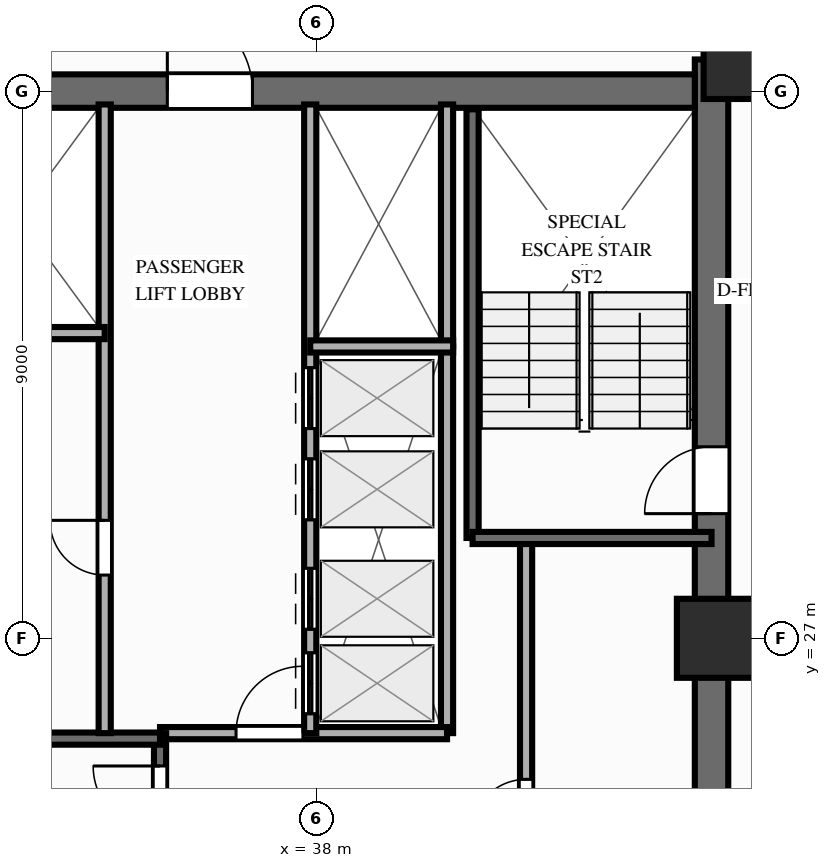
"""IFC4 building model, lengths in metres.
Left out: names, types, materials, properties, quantities, classifications, styles, units other than length and angle.
Written with IfcOpenShell. Run it as: python <this file> out.ifc"""

import sys

from ifc_helpers import new_model, si_unit, direction, frame, frame_2d, origin, origin_2d, place, context, subcontext, project, spatial, rectangle, extrude, source, transform, mapped, element, fill, save


model = new_model("IFC4")
c1 = context("Model", 3, precision=1e-05, world=origin(), true_north=direction((0.0, 1.0)))
c2 = subcontext(c1, "Body", "Model", "MODEL_VIEW")
j1 = project(units=[si_unit("LENGTHUNIT", "METRE"), si_unit("PLANEANGLEUNIT", "RADIAN")], contexts=[c1])
p1 = place(None, origin())
s1 = spatial("IfcSite", under=j1, at=p1, CompositionType="ELEMENT")
p2 = place(p1, origin())
s2 = spatial("IfcBuilding", under=s1, at=p2, CompositionType="ELEMENT")
p3 = place(p2, frame((0.0, 0.0, 141.75)))
s3 = spatial("IfcBuildingStorey", under=s2, at=p3, CompositionType="ELEMENT", Elevation=141.75)
p4 = place(p3, frame((44.5, 17.48, 0.0), z_axis=(0.0, 0.0, 1.0), x_axis=(0.0, 1.0, 0.0)))
e1 = element("IfcWall", 1, at=p4, inside=s3, PredefinedType="SHEAR", context=c2, shape_type="SweptSolid", body=[
    extrude(rectangle(XDim=19.04, YDim=0.55, at=frame_2d((9.52, 0.0))), origin(), (0.0, 0.0, 1.0), 3.0),
])
p5 = place(p4, frame((12.67, 0.0, 0.0), z_axis=(0.0, 0.0, 1.0), x_axis=(-1.0, 0.0, 0.0)))
e2 = element("IfcOpeningElement", 2, at=p5, cuts=e1, PredefinedType="OPENING", context=c2, shape_type="SweptSolid", body=[
    extrude(rectangle(XDim=1.1, YDim=2.15, at=frame_2d((0.55, 1.075))), frame((0.0, 0.287, 0.0), z_axis=(0.0, -1.0, 0.0), x_axis=(1.0, 0.0, 0.0)), (0.0, 0.0, 1.0), 0.574),
])
p6 = place(p3, frame((31.775, 36.0, 0.0), z_axis=(0.0, 0.0, 1.0), x_axis=(1.0, 0.0, 0.0)))
e3 = element("IfcWall", 3, at=p6, inside=s3, PredefinedType="SHEAR", context=c2, shape_type="SweptSolid", body=[
    extrude(rectangle(XDim=12.45, YDim=0.55, at=frame_2d((6.225, 0.0))), origin(), (0.0, 0.0, 1.0), 3.0),
])
p7 = place(p6, frame((5.175, 0.0, 0.0), z_axis=(0.0, 0.0, 1.0), x_axis=(-1.0, 0.0, 0.0)))
e4 = element("IfcOpeningElement", 4, at=p7, cuts=e3, PredefinedType="OPENING", context=c2, shape_type="SweptSolid", body=[
    extrude(rectangle(XDim=1.4, YDim=2.15, at=frame_2d((0.7, 1.075))), frame((0.0, 0.287, 0.0), z_axis=(0.0, -1.0, 0.0), x_axis=(1.0, 0.0, 0.0)), (0.0, 0.0, 1.0), 0.574),
])
m1 = source(origin(), c2, "Body", "SweptSolid", [
    extrude(rectangle(XDim=1.3, YDim=1.3, at=origin_2d()), origin(), (0.0, 0.0, 1.0), 3.0),
])
for number, where, z_axis, x_axis in (
    (5, (45.02, 36.52, 0.0), (0.0, 0.0, 1.0), (1.0, 0.0, 0.0)),
    (6, (44.58, 27.0, 0.0), (0.0, 0.0, 1.0), (1.0, 0.0, 0.0)),
):
    element("IfcColumn", number, at=place(p3, frame(where, z_axis=z_axis, x_axis=x_axis)), inside=s3, PredefinedType="COLUMN", context=c2, shape_type="MappedRepresentation", body=[
        mapped(m1, transform((0.0, 0.0, 0.0), scale=1.0)),
    ])
p8 = place(p3, frame((41.45, 21.18, 0.0), z_axis=(0.0, 0.0, 1.0), x_axis=(0.0, 1.0, 0.0)))
e7 = element("IfcWall", 7, at=p8, inside=s3, PredefinedType="PARTITIONING", context=c2, shape_type="SweptSolid", body=[
    extrude(rectangle(XDim=7.42, YDim=0.2, at=frame_2d((3.71, 0.0))), origin(), (0.0, 0.0, 1.0), 2.7),
])
p9 = place(p8, frame((2.6, 0.0, 0.0)))
e8 = element("IfcOpeningElement", 8, at=p9, cuts=e7, PredefinedType="OPENING", context=c2, shape_type="SweptSolid", body=[
    extrude(rectangle(XDim=0.9, YDim=2.1, at=frame_2d((0.45, 1.05))), frame((0.0, 0.112, 0.0), z_axis=(0.0, -1.0, 0.0), x_axis=(1.0, 0.0, 0.0)), (0.0, 0.0, 1.0), 0.224),
])
p10 = place(p3, frame((40.15, 25.44, 0.0), z_axis=(0.0, 0.0, 1.0), x_axis=(0.0, 1.0, 0.0)))
e9 = element("IfcWall", 9, at=p10, inside=s3, PredefinedType="PARTITIONING", context=c2, shape_type="SweptSolid", body=[
    extrude(rectangle(XDim=6.36, YDim=0.2, at=frame_2d((3.18, 0.0))), origin(), (0.0, 0.0, 1.0), 2.7),
])
p11 = place(p3, frame((40.15, 31.8, 0.0), z_axis=(0.0, 0.0, 1.0), x_axis=(0.0, 1.0, 0.0)))
e10 = element("IfcWall", 10, at=p11, inside=s3, PredefinedType="PARTITIONING", context=c2, shape_type="SweptSolid", body=[
    extrude(rectangle(XDim=3.98, YDim=0.2, at=frame_2d((1.99, 0.0))), origin(), (0.0, 0.0, 1.0), 2.7),
])
p12 = place(p3, frame((35.43, 25.44, 0.0), z_axis=(0.0, 0.0, 1.0), x_axis=(1.0, 0.0, 0.0)))
e11 = element("IfcWall", 11, at=p12, inside=s3, PredefinedType="PARTITIONING", context=c2, shape_type="SweptSolid", body=[
    extrude(rectangle(XDim=4.72, YDim=0.2, at=frame_2d((2.36, 0.0))), origin(), (0.0, 0.0, 1.0), 2.7),
])
p13 = place(p12, frame((1.25, 0.0, 0.0)))
e12 = element("IfcOpeningElement", 12, at=p13, cuts=e11, PredefinedType="OPENING", context=c2, shape_type="SweptSolid", body=[
    extrude(rectangle(XDim=1.1, YDim=2.15, at=frame_2d((0.55, 1.075))), frame((0.0, 0.112, 0.0), z_axis=(0.0, -1.0, 0.0), x_axis=(1.0, 0.0, 0.0)), (0.0, 0.0, 1.0), 0.224),
])
p14 = place(p3, frame((35.43, 18.22, 0.0), z_axis=(0.0, 0.0, 1.0), x_axis=(0.0, 1.0, 0.0)))
e13 = element("IfcWall", 13, at=p14, inside=s3, PredefinedType="SOLIDWALL", context=c2, shape_type="SweptSolid", body=[
    extrude(rectangle(XDim=7.22, YDim=0.2, at=frame_2d((3.61, 0.0))), origin(), (0.0, 0.0, 1.0), 2.7),
])
p15 = place(p14, frame((6.68, 0.0, 0.0), z_axis=(0.0, 0.0, 1.0), x_axis=(-1.0, 0.0, 0.0)))
e14 = element("IfcOpeningElement", 14, at=p15, cuts=e13, PredefinedType="OPENING", context=c2, shape_type="SweptSolid", body=[
    extrude(rectangle(XDim=1.1, YDim=2.15, at=frame_2d((0.55, 1.075))), frame((0.0, 0.112, 0.0), z_axis=(0.0, -1.0, 0.0), x_axis=(1.0, 0.0, 0.0)), (0.0, 0.0, 1.0), 0.224),
])
p16 = place(p3, frame((31.5, 25.35, 0.0), z_axis=(0.0, 0.0, 1.0), x_axis=(1.0, 0.0, 0.0)))
e15 = element("IfcWall", 15, at=p16, inside=s3, PredefinedType="SOLIDWALL", context=c2, shape_type="SweptSolid", body=[
    extrude(rectangle(XDim=3.93, YDim=0.2, at=frame_2d((1.965, 0.0))), origin(), (0.0, 0.0, 1.0), 2.7),
])
p17 = place(p3, frame((40.57, 28.65, 0.0), z_axis=(0.0, 0.0, 1.0), x_axis=(0.0, 1.0, 0.0)))
e16 = element("IfcWall", 16, at=p17, inside=s3, PredefinedType="SOLIDWALL", context=c2, shape_type="SweptSolid", body=[
    extrude(rectangle(XDim=7.05, YDim=0.2, at=frame_2d((3.525, 0.0))), origin(), (0.0, 0.0, 1.0), 2.7),
])
p18 = place(p3, frame((40.57, 28.65, 0.0), z_axis=(0.0, 0.0, 1.0), x_axis=(1.0, 0.0, 0.0)))
e17 = element("IfcWall", 17, at=p18, inside=s3, PredefinedType="SOLIDWALL", context=c2, shape_type="SweptSolid", body=[
    extrude(rectangle(XDim=3.93, YDim=0.2, at=frame_2d((1.965, 0.0))), origin(), (0.0, 0.0, 1.0), 2.7),
])
p19 = place(p3, frame((34.52, 25.44, 0.0), z_axis=(0.0, 0.0, 1.0), x_axis=(0.0, 1.0, 0.0)))
e18 = element("IfcWall", 18, at=p19, inside=s3, PredefinedType="PARTITIONING", context=c2, shape_type="SweptSolid", body=[
    extrude(rectangle(XDim=10.34, YDim=0.2, at=frame_2d((5.17, 0.0))), origin(), (0.0, 0.0, 1.0), 2.7),
])
p20 = place(p19, frame((2.6, 0.0, 0.0)))
e19 = element("IfcOpeningElement", 19, at=p20, cuts=e18, PredefinedType="OPENING", context=c2, shape_type="SweptSolid", body=[
    extrude(rectangle(XDim=0.9, YDim=2.1, at=frame_2d((0.45, 1.05))), frame((0.0, 0.112, 0.0), z_axis=(0.0, -1.0, 0.0), x_axis=(1.0, 0.0, 0.0)), (0.0, 0.0, 1.0), 0.224),
])
p21 = place(p3, frame((31.72, 32.02, 0.0), z_axis=(0.0, 0.0, 1.0), x_axis=(1.0, 0.0, 0.0)))
e20 = element("IfcWall", 20, at=p21, inside=s3, PredefinedType="PARTITIONING", context=c2, shape_type="SweptSolid", body=[
    extrude(rectangle(XDim=2.8, YDim=0.2, at=frame_2d((1.4, 0.0))), origin(), (0.0, 0.0, 1.0), 2.7),
])
p22 = place(p3, frame((37.9, 25.44, 0.0), z_axis=(0.0, 0.0, 1.0), x_axis=(0.0, 1.0, 0.0)))
e21 = element("IfcWall", 21, at=p22, inside=s3, PredefinedType="PARTITIONING", context=c2, shape_type="SweptSolid", body=[
    extrude(rectangle(XDim=10.34, YDim=0.2, at=frame_2d((5.17, 0.0))), origin(), (0.0, 0.0, 1.0), 2.7),
])
p23 = place(p22, frame((0.32, 0.0, 0.0)))
e22 = element("IfcOpeningElement", 22, at=p23, cuts=e21, PredefinedType="OPENING", context=c2, shape_type="SweptSolid", body=[
    extrude(rectangle(XDim=1.0, YDim=2.15, at=frame_2d((0.5, 1.075))), frame((0.0, 0.112, 0.0), z_axis=(0.0, -1.0, 0.0), x_axis=(1.0, 0.0, 0.0)), (0.0, 0.0, 1.0), 0.224),
])
p24 = place(p22, frame((1.71, 0.0, 0.0)))
e23 = element("IfcOpeningElement", 23, at=p24, cuts=e21, PredefinedType="OPENING", context=c2, shape_type="SweptSolid", body=[
    extrude(rectangle(XDim=1.0, YDim=2.15, at=frame_2d((0.5, 1.075))), frame((0.0, 0.112, 0.0), z_axis=(0.0, -1.0, 0.0), x_axis=(1.0, 0.0, 0.0)), (0.0, 0.0, 1.0), 0.224),
])
p25 = place(p22, frame((3.51, 0.0, 0.0)))
e24 = element("IfcOpeningElement", 24, at=p25, cuts=e21, PredefinedType="OPENING", context=c2, shape_type="SweptSolid", body=[
    extrude(rectangle(XDim=1.0, YDim=2.15, at=frame_2d((0.5, 1.075))), frame((0.0, 0.112, 0.0), z_axis=(0.0, -1.0, 0.0), x_axis=(1.0, 0.0, 0.0)), (0.0, 0.0, 1.0), 0.224),
])
p26 = place(p22, frame((5.01, 0.0, 0.0)))
e25 = element("IfcOpeningElement", 25, at=p26, cuts=e21, PredefinedType="OPENING", context=c2, shape_type="SweptSolid", body=[
    extrude(rectangle(XDim=1.0, YDim=2.15, at=frame_2d((0.5, 1.075))), frame((0.0, 0.112, 0.0), z_axis=(0.0, -1.0, 0.0), x_axis=(1.0, 0.0, 0.0)), (0.0, 0.0, 1.0), 0.224),
])
p27 = place(p3, frame((37.9, 31.8, 0.0), z_axis=(0.0, 0.0, 1.0), x_axis=(1.0, 0.0, 0.0)))
e26 = element("IfcWall", 26, at=p27, inside=s3, PredefinedType="PARTITIONING", context=c2, shape_type="SweptSolid", body=[
    extrude(rectangle(XDim=2.35, YDim=0.2, at=frame_2d((1.175, 0.0))), origin(), (0.0, 0.0, 1.0), 2.7),
])
m2 = source(origin(), c2, "Body", "SweptSolid", [
    extrude(rectangle(XDim=1.1, YDim=2.15, at=frame_2d((0.55, 1.075))), frame((0.0, 0.025, 0.0), z_axis=(0.0, -1.0, 0.0), x_axis=(1.0, 0.0, 0.0)), (0.0, 0.0, 1.0), 0.05),
])
p28 = place(p5, origin())
e27 = element("IfcDoor", 27, at=p28, inside=s3, OperationType="SINGLE_SWING_RIGHT", PredefinedType="DOOR", context=c2, shape_type="MappedRepresentation", body=[
    mapped(m2, transform((0.0, 0.0, 0.0), scale=1.0)),
])
fill(e2, e27)
m3 = source(origin(), c2, "Body", "SweptSolid", [
    extrude(rectangle(XDim=1.4, YDim=2.15, at=frame_2d((0.7, 1.075))), frame((0.0, 0.025, 0.0), z_axis=(0.0, -1.0, 0.0), x_axis=(1.0, 0.0, 0.0)), (0.0, 0.0, 1.0), 0.05),
])
p29 = place(p7, origin())
e28 = element("IfcDoor", 28, at=p29, inside=s3, OperationType="SINGLE_SWING_RIGHT", PredefinedType="DOOR", context=c2, shape_type="MappedRepresentation", body=[
    mapped(m3, transform((0.0, 0.0, 0.0), scale=1.0)),
])
fill(e4, e28)
m4 = source(origin(), c2, "Body", "SweptSolid", [
    extrude(rectangle(XDim=0.9, YDim=2.1, at=frame_2d((0.45, 1.05))), frame((0.0, 0.025, 0.0), z_axis=(0.0, -1.0, 0.0), x_axis=(1.0, 0.0, 0.0)), (0.0, 0.0, 1.0), 0.05),
])
p30 = place(p9, origin())
e29 = element("IfcDoor", 29, at=p30, inside=s3, OperationType="SINGLE_SWING_LEFT", PredefinedType="DOOR", context=c2, shape_type="MappedRepresentation", body=[
    mapped(m4, transform((0.0, 0.0, 0.0), scale=1.0)),
])
fill(e8, e29)
p31 = place(p13, origin())
e30 = element("IfcDoor", 30, at=p31, inside=s3, OperationType="SINGLE_SWING_RIGHT", PredefinedType="DOOR", context=c2, shape_type="MappedRepresentation", body=[
    mapped(m2, transform((0.0, 0.0, 0.0), scale=1.0)),
])
fill(e12, e30)
p32 = place(p15, origin())
e31 = element("IfcDoor", 31, at=p32, inside=s3, OperationType="SINGLE_SWING_LEFT", PredefinedType="DOOR", context=c2, shape_type="MappedRepresentation", body=[
    mapped(m2, transform((0.0, 0.0, 0.0), scale=1.0)),
])
fill(e14, e31)
p33 = place(p20, origin())
e32 = element("IfcDoor", 32, at=p33, inside=s3, OperationType="SINGLE_SWING_RIGHT", PredefinedType="DOOR", context=c2, shape_type="MappedRepresentation", body=[
    mapped(m4, transform((0.0, 0.0, 0.0), scale=1.0)),
])
fill(e19, e32)
m5 = source(origin(), c2, "Body", "SweptSolid", [
    extrude(rectangle(XDim=1.0, YDim=2.15, at=frame_2d((0.5, 1.075))), frame((0.0, 0.025, 0.0), z_axis=(0.0, -1.0, 0.0), x_axis=(1.0, 0.0, 0.0)), (0.0, 0.0, 1.0), 0.05),
])
p34 = place(p23, origin())
e33 = element("IfcDoor", 33, at=p34, inside=s3, OperationType="DOUBLE_DOOR_SLIDING", PredefinedType="DOOR", context=c2, shape_type="MappedRepresentation", body=[
    mapped(m5, transform((0.0, 0.0, 0.0), scale=1.0)),
])
fill(e22, e33)
p35 = place(p24, origin())
e34 = element("IfcDoor", 34, at=p35, inside=s3, OperationType="DOUBLE_DOOR_SLIDING", PredefinedType="DOOR", context=c2, shape_type="MappedRepresentation", body=[
    mapped(m5, transform((0.0, 0.0, 0.0), scale=1.0)),
])
fill(e23, e34)
p36 = place(p25, origin())
e35 = element("IfcDoor", 35, at=p36, inside=s3, OperationType="DOUBLE_DOOR_SLIDING", PredefinedType="DOOR", context=c2, shape_type="MappedRepresentation", body=[
    mapped(m5, transform((0.0, 0.0, 0.0), scale=1.0)),
])
fill(e24, e35)
p37 = place(p26, origin())
e36 = element("IfcDoor", 36, at=p37, inside=s3, OperationType="DOUBLE_DOOR_SLIDING", PredefinedType="DOOR", context=c2, shape_type="MappedRepresentation", body=[
    mapped(m5, transform((0.0, 0.0, 0.0), scale=1.0)),
])
fill(e25, e36)
save(model, sys.argv[1])
